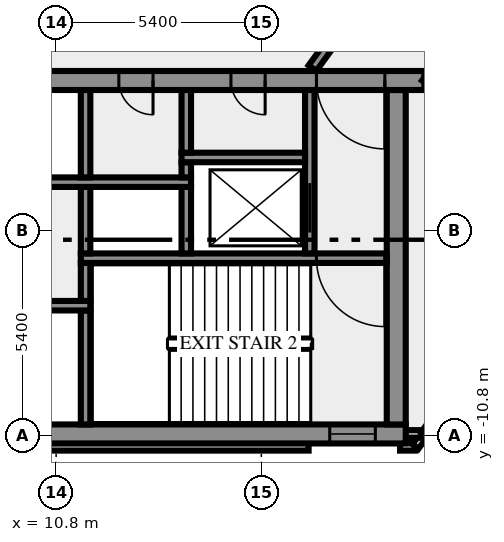
"""IFC4 building model, lengths in metres.
Left out: names, types, materials, properties, quantities, classifications, styles, units other than length and angle.
Written with IfcOpenShell. Run it as: python <this file> out.ifc"""

import sys

from ifc_helpers import new_model, si_unit, direction, frame, frame_2d, origin, place, context, subcontext, project, spatial, rectangle, extrude, element, fill, save


model = new_model("IFC4")
c1 = context("Model", 3, precision=1e-05, world=origin(), true_north=direction((0.0, 1.0)))
c2 = subcontext(c1, "Body", "Model", "MODEL_VIEW")
j1 = project(units=[si_unit("LENGTHUNIT", "METRE"), si_unit("PLANEANGLEUNIT", "RADIAN")], contexts=[c1])
p1 = place(None, origin())
s1 = spatial("IfcSite", under=j1, at=p1, CompositionType="ELEMENT")
p2 = place(p1, origin())
s2 = spatial("IfcBuilding", under=s1, at=p2, CompositionType="ELEMENT")
p3 = place(p2, frame((0.0, 0.0, 117.0)))
s3 = spatial("IfcBuildingStorey", under=s2, at=p3, CompositionType="ELEMENT", Elevation=117.0)
p4 = place(p3, frame((-17.444, -11.088, 0.0), z_axis=(0.0, 0.0, 1.0), x_axis=(1.0, 0.0, 0.0)))
e1 = element("IfcWall", 1, at=p4, inside=s3, PredefinedType="SOLIDWALL", context=c2, shape_type="SweptSolid", body=[
    extrude(rectangle(XDim=34.888, YDim=0.2, at=frame_2d((17.444, 0.0))), origin(), (0.0, 0.0, 1.0), 3.65),
])
p5 = place(p3, frame((19.85, -11.088, 0.0), z_axis=(0.0, 0.0, 1.0), x_axis=(1.0, 0.0, 0.0)))
e2 = element("IfcWall", 2, at=p5, inside=s3, PredefinedType="SOLIDWALL", context=c2, shape_type="SweptSolid", body=[
    extrude(rectangle(XDim=0.406, YDim=0.2, at=frame_2d((0.203, 0.0))), origin(), (0.0, 0.0, 1.0), 3.65),
])
p6 = place(p3, frame((20.253, -11.083, 0.0), z_axis=(0.0, 0.0, 1.0), x_axis=(0.587766567315, 0.809030569476, 0.0)))
e3 = element("IfcWall", 3, at=p6, inside=s3, PredefinedType="SOLIDWALL", context=c2, shape_type="SweptSolid", body=[
    extrude(rectangle(XDim=2.688, YDim=0.2, at=frame_2d((1.344, 0.0))), origin(), (0.0, 0.0, 1.0), 3.65),
])
p7 = place(p3, frame((19.98, -10.75, 0.0), z_axis=(0.0, 0.0, 1.0), x_axis=(1.0, 0.0, 0.0)))
e4 = element("IfcWall", 4, at=p7, inside=s3, PredefinedType="SOLIDWALL", context=c2, shape_type="SweptSolid", body=[
    extrude(rectangle(XDim=0.417, YDim=0.2, at=frame_2d((0.208, 0.0))), origin(), (0.0, 0.0, 1.0), 3.65),
])
p8 = place(p3, frame((-20.0, -10.75, 0.0), z_axis=(0.0, 0.0, 1.0), x_axis=(1.0, 0.0, 0.0)))
e5 = element("IfcWall", 5, at=p8, inside=s3, PredefinedType="SHEAR", context=c2, shape_type="SweptSolid", body=[
    extrude(rectangle(XDim=40.0, YDim=0.5, at=frame_2d((20.0, 0.0))), origin(), (0.0, 0.0, 1.0), 3.65),
])
p9 = place(p8, frame((0.8, 0.0, 1.0)))
e6 = element("IfcOpeningElement", 6, at=p9, cuts=e5, PredefinedType="OPENING", context=c2, shape_type="SweptSolid", body=[
    extrude(rectangle(XDim=1.2, YDim=1.2, at=frame_2d((0.6, 0.6))), frame((0.0, 0.26, 0.0), z_axis=(0.0, -1.0, 0.0), x_axis=(1.0, 0.0, 0.0)), (0.0, 0.0, 1.0), 0.52),
])
p10 = place(p8, frame((38.0, 0.0, 1.0)))
e7 = element("IfcOpeningElement", 7, at=p10, cuts=e5, PredefinedType="OPENING", context=c2, shape_type="SweptSolid", body=[
    extrude(rectangle(XDim=1.2, YDim=1.2, at=frame_2d((0.6, 0.6))), frame((0.0, 0.26, 0.0), z_axis=(0.0, -1.0, 0.0), x_axis=(1.0, 0.0, 0.0)), (0.0, 0.0, 1.0), 0.52),
])
p11 = place(p3, frame((11.575, -10.5, 0.0), z_axis=(0.0, 0.0, 1.0), x_axis=(0.0, 1.0, 0.0)))
e8 = element("IfcWall", 8, at=p11, inside=s3, PredefinedType="SHEAR", context=c2, shape_type="SweptSolid", body=[
    extrude(rectangle(XDim=3.0, YDim=0.25, at=frame_2d((1.5, 0.0))), origin(), (0.0, 0.0, 1.0), 3.65),
])
p12 = place(p3, frame((19.75, -10.5, 0.0), z_axis=(0.0, 0.0, 1.0), x_axis=(0.0, 1.0, 0.0)))
e9 = element("IfcWall", 9, at=p12, inside=s3, PredefinedType="SHEAR", context=c2, shape_type="SweptSolid", body=[
    extrude(rectangle(XDim=8.8, YDim=0.5, at=frame_2d((4.4, 0.0))), origin(), (0.0, 0.0, 1.0), 3.65),
])
p13 = place(p3, frame((11.7, -7.375, 0.0), z_axis=(0.0, 0.0, 1.0), x_axis=(-1.0, 0.0, 0.0)))
e10 = element("IfcWall", 10, at=p13, inside=s3, PredefinedType="SHEAR", context=c2, shape_type="SweptSolid", body=[
    extrude(rectangle(XDim=23.4, YDim=0.25, at=frame_2d((11.7, 0.0))), origin(), (0.0, 0.0, 1.0), 3.65),
])
p14 = place(p13, frame((21.45, 0.0, 0.0)))
e11 = element("IfcOpeningElement", 11, at=p14, cuts=e10, PredefinedType="OPENING", context=c2, shape_type="SweptSolid", body=[
    extrude(rectangle(XDim=1.1, YDim=2.1, at=frame_2d((0.55, 1.05))), frame((0.0, 0.135, 0.0), z_axis=(0.0, -1.0, 0.0), x_axis=(1.0, 0.0, 0.0)), (0.0, 0.0, 1.0), 0.27),
])
p15 = place(p13, frame((18.95, 0.0, 0.0)))
e12 = element("IfcOpeningElement", 12, at=p15, cuts=e10, PredefinedType="OPENING", context=c2, shape_type="SweptSolid", body=[
    extrude(rectangle(XDim=1.1, YDim=2.1, at=frame_2d((0.55, 1.05))), frame((0.0, 0.135, 0.0), z_axis=(0.0, -1.0, 0.0), x_axis=(1.0, 0.0, 0.0)), (0.0, 0.0, 1.0), 0.27),
])
p16 = place(p13, frame((16.45, 0.0, 0.0)))
e13 = element("IfcOpeningElement", 13, at=p16, cuts=e10, PredefinedType="OPENING", context=c2, shape_type="SweptSolid", body=[
    extrude(rectangle(XDim=1.1, YDim=2.1, at=frame_2d((0.55, 1.05))), frame((0.0, 0.135, 0.0), z_axis=(0.0, -1.0, 0.0), x_axis=(1.0, 0.0, 0.0)), (0.0, 0.0, 1.0), 0.27),
])
p17 = place(p13, frame((13.875, 0.0, 0.0)))
e14 = element("IfcOpeningElement", 14, at=p17, cuts=e10, PredefinedType="OPENING", context=c2, shape_type="SweptSolid", body=[
    extrude(rectangle(XDim=0.9, YDim=2.1, at=frame_2d((0.45, 1.05))), frame((0.0, 0.135, 0.0), z_axis=(0.0, -1.0, 0.0), x_axis=(1.0, 0.0, 0.0)), (0.0, 0.0, 1.0), 0.27),
])
p18 = place(p13, frame((11.1, 0.0, 0.0)))
e15 = element("IfcOpeningElement", 15, at=p18, cuts=e10, PredefinedType="OPENING", context=c2, shape_type="SweptSolid", body=[
    extrude(rectangle(XDim=0.9, YDim=2.1, at=frame_2d((0.45, 1.05))), frame((0.0, 0.135, 0.0), z_axis=(0.0, -1.0, 0.0), x_axis=(1.0, 0.0, 0.0)), (0.0, 0.0, 1.0), 0.27),
])
p19 = place(p3, frame((11.575, -7.25, 0.0), z_axis=(0.0, 0.0, 1.0), x_axis=(0.0, 1.0, 0.0)))
e16 = element("IfcWall", 16, at=p19, inside=s3, PredefinedType="SHEAR", context=c2, shape_type="SweptSolid", body=[
    extrude(rectangle(XDim=1.0, YDim=0.25, at=frame_2d((0.5, 0.0))), origin(), (0.0, 0.0, 1.0), 3.65),
])
p20 = place(p3, frame((19.5, -6.125, 0.0), z_axis=(0.0, 0.0, 1.0), x_axis=(-1.0, 0.0, 0.0)))
e17 = element("IfcWall", 17, at=p20, inside=s3, PredefinedType="SHEAR", context=c2, shape_type="SweptSolid", body=[
    extrude(rectangle(XDim=8.05, YDim=0.25, at=frame_2d((4.025, 0.0))), origin(), (0.0, 0.0, 1.0), 3.65),
])
p21 = place(p20, frame((0.05, 0.0, 0.0)))
e18 = element("IfcOpeningElement", 18, at=p21, cuts=e17, PredefinedType="OPENING", context=c2, shape_type="SweptSolid", body=[
    extrude(rectangle(XDim=1.8, YDim=2.1, at=frame_2d((0.9, 1.05))), frame((0.0, 0.135, 0.0), z_axis=(0.0, -1.0, 0.0), x_axis=(1.0, 0.0, 0.0)), (0.0, 0.0, 1.0), 0.27),
])
for number, where, z_axis, x_axis in (
    (19, (11.575, -6.0, 0.0), (0.0, 0.0, 1.0), (0.0, 1.0, 0.0)),
    (20, (14.225, -6.0, 0.0), (0.0, 0.0, 1.0), (0.0, 1.0, 0.0)),
):
    element("IfcWall", number, at=place(p3, frame(where, z_axis=z_axis, x_axis=x_axis)), inside=s3, PredefinedType="SHEAR", context=c2, shape_type="SweptSolid", body=[
        extrude(rectangle(XDim=1.75, YDim=0.25, at=frame_2d((0.875, 0.0))), origin(), (0.0, 0.0, 1.0), 3.65),
    ])
p22 = place(p3, frame((17.475, -6.0, 0.0), z_axis=(0.0, 0.0, 1.0), x_axis=(0.0, 1.0, 0.0)))
e21 = element("IfcWall", 21, at=p22, inside=s3, PredefinedType="SHEAR", context=c2, shape_type="SweptSolid", body=[
    extrude(rectangle(XDim=4.3, YDim=0.25, at=frame_2d((2.15, 0.0))), origin(), (0.0, 0.0, 1.0), 3.65),
])
p23 = place(p22, frame((0.55, 0.0, 0.0)))
e22 = element("IfcOpeningElement", 22, at=p23, cuts=e21, PredefinedType="OPENING", context=c2, shape_type="SweptSolid", body=[
    extrude(rectangle(XDim=1.3, YDim=2.1, at=frame_2d((0.65, 1.05))), frame((0.0, 0.135, 0.0), z_axis=(0.0, -1.0, 0.0), x_axis=(1.0, 0.0, 0.0)), (0.0, 0.0, 1.0), 0.27),
])
p24 = place(p3, frame((-0.6, -4.125, 0.0), z_axis=(0.0, 0.0, 1.0), x_axis=(1.0, 0.0, 0.0)))
e23 = element("IfcWall", 23, at=p24, inside=s3, PredefinedType="SHEAR", context=c2, shape_type="SweptSolid", body=[
    extrude(rectangle(XDim=14.95, YDim=0.25, at=frame_2d((7.475, 0.0))), origin(), (0.0, 0.0, 1.0), 3.65),
])
p25 = place(p24, frame((2.75, 0.0, 0.0)))
e24 = element("IfcOpeningElement", 24, at=p25, cuts=e23, PredefinedType="OPENING", context=c2, shape_type="SweptSolid", body=[
    extrude(rectangle(XDim=1.3, YDim=2.1, at=frame_2d((0.65, 1.05))), frame((0.0, 0.135, 0.0), z_axis=(0.0, -1.0, 0.0), x_axis=(1.0, 0.0, 0.0)), (0.0, 0.0, 1.0), 0.27),
])
p26 = place(p3, frame((11.575, -4.0, 0.0), z_axis=(0.0, 0.0, 1.0), x_axis=(0.0, 1.0, 0.0)))
e25 = element("IfcWall", 25, at=p26, inside=s3, PredefinedType="SHEAR", context=c2, shape_type="SweptSolid", body=[
    extrude(rectangle(XDim=2.3, YDim=0.25, at=frame_2d((1.15, 0.0))), origin(), (0.0, 0.0, 1.0), 3.65),
])
p27 = place(p3, frame((14.225, -4.0, 0.0), z_axis=(0.0, 0.0, 1.0), x_axis=(0.0, 1.0, 0.0)))
e26 = element("IfcWall", 26, at=p27, inside=s3, PredefinedType="SHEAR", context=c2, shape_type="SweptSolid", body=[
    extrude(rectangle(XDim=0.4, YDim=0.25, at=frame_2d((0.2, 0.0))), origin(), (0.0, 0.0, 1.0), 3.65),
])
p28 = place(p3, frame((14.1, -3.475, 0.0), z_axis=(0.0, 0.0, 1.0), x_axis=(1.0, 0.0, 0.0)))
e27 = element("IfcWall", 27, at=p28, inside=s3, PredefinedType="SHEAR", context=c2, shape_type="SweptSolid", body=[
    extrude(rectangle(XDim=3.25, YDim=0.25, at=frame_2d((1.625, 0.0))), origin(), (0.0, 0.0, 1.0), 3.65),
])
p29 = place(p3, frame((14.225, -3.35, 0.0), z_axis=(0.0, 0.0, 1.0), x_axis=(0.0, 1.0, 0.0)))
e28 = element("IfcWall", 28, at=p29, inside=s3, PredefinedType="SHEAR", context=c2, shape_type="SweptSolid", body=[
    extrude(rectangle(XDim=1.65, YDim=0.25, at=frame_2d((0.825, 0.0))), origin(), (0.0, 0.0, 1.0), 3.65),
])
p30 = place(p3, frame((20.49, -1.45, 0.0), z_axis=(0.0, 0.0, 1.0), x_axis=(-1.0, 0.0, 0.0)))
e29 = element("IfcWall", 29, at=p30, inside=s3, PredefinedType="SHEAR", context=c2, shape_type="SweptSolid", body=[
    extrude(rectangle(XDim=40.98, YDim=0.5, at=frame_2d((20.49, 0.0))), origin(), (0.0, 0.0, 1.0), 3.65),
])
p31 = place(p30, frame((38.14, 0.0, 0.0)))
e30 = element("IfcOpeningElement", 30, at=p31, cuts=e29, PredefinedType="OPENING", context=c2, shape_type="SweptSolid", body=[
    extrude(rectangle(XDim=1.8, YDim=2.1, at=frame_2d((0.9, 1.05))), frame((0.0, 0.26, 0.0), z_axis=(0.0, -1.0, 0.0), x_axis=(1.0, 0.0, 0.0)), (0.0, 0.0, 1.0), 0.52),
])
p32 = place(p30, frame((36.728, 0.0, 0.0)))
e31 = element("IfcOpeningElement", 31, at=p32, cuts=e29, PredefinedType="OPENING", context=c2, shape_type="SweptSolid", body=[
    extrude(rectangle(XDim=0.8, YDim=2.1, at=frame_2d((0.4, 1.05))), frame((0.0, 0.26, 0.0), z_axis=(0.0, -1.0, 0.0), x_axis=(1.0, 0.0, 0.0)), (0.0, 0.0, 1.0), 0.52),
])
p33 = place(p30, frame((35.153, 0.0, 0.0)))
e32 = element("IfcOpeningElement", 32, at=p33, cuts=e29, PredefinedType="OPENING", context=c2, shape_type="SweptSolid", body=[
    extrude(rectangle(XDim=0.8, YDim=2.1, at=frame_2d((0.4, 1.05))), frame((0.0, 0.26, 0.0), z_axis=(0.0, -1.0, 0.0), x_axis=(1.0, 0.0, 0.0)), (0.0, 0.0, 1.0), 0.52),
])
p34 = place(p30, frame((32.94, 0.0, 0.0)))
e33 = element("IfcOpeningElement", 33, at=p34, cuts=e29, PredefinedType="OPENING", context=c2, shape_type="SweptSolid", body=[
    extrude(rectangle(XDim=0.9, YDim=2.1, at=frame_2d((0.45, 1.05))), frame((0.0, 0.26, 0.0), z_axis=(0.0, -1.0, 0.0), x_axis=(1.0, 0.0, 0.0)), (0.0, 0.0, 1.0), 0.52),
])
p35 = place(p30, frame((21.765, 0.0, 0.0)))
e34 = element("IfcOpeningElement", 34, at=p35, cuts=e29, PredefinedType="OPENING", context=c2, shape_type="SweptSolid", body=[
    extrude(rectangle(XDim=2.0, YDim=2.1, at=frame_2d((1.0, 1.05))), frame((0.0, 0.26, 0.0), z_axis=(0.0, -1.0, 0.0), x_axis=(1.0, 0.0, 0.0)), (0.0, 0.0, 1.0), 0.52),
])
p36 = place(p30, frame((7.14, 0.0, 0.0)))
e35 = element("IfcOpeningElement", 35, at=p36, cuts=e29, PredefinedType="OPENING", context=c2, shape_type="SweptSolid", body=[
    extrude(rectangle(XDim=0.9, YDim=2.1, at=frame_2d((0.45, 1.05))), frame((0.0, 0.26, 0.0), z_axis=(0.0, -1.0, 0.0), x_axis=(1.0, 0.0, 0.0)), (0.0, 0.0, 1.0), 0.52),
])
p37 = place(p30, frame((4.19, 0.0, 0.0)))
e36 = element("IfcOpeningElement", 36, at=p37, cuts=e29, PredefinedType="OPENING", context=c2, shape_type="SweptSolid", body=[
    extrude(rectangle(XDim=0.9, YDim=2.1, at=frame_2d((0.45, 1.05))), frame((0.0, 0.26, 0.0), z_axis=(0.0, -1.0, 0.0), x_axis=(1.0, 0.0, 0.0)), (0.0, 0.0, 1.0), 0.52),
])
p38 = place(p30, frame((1.04, 0.0, 0.0)))
e37 = element("IfcOpeningElement", 37, at=p38, cuts=e29, PredefinedType="OPENING", context=c2, shape_type="SweptSolid", body=[
    extrude(rectangle(XDim=1.8, YDim=2.1, at=frame_2d((0.9, 1.05))), frame((0.0, 0.26, 0.0), z_axis=(0.0, -1.0, 0.0), x_axis=(1.0, 0.0, 0.0)), (0.0, 0.0, 1.0), 0.52),
])
p39 = place(p3, frame((40.463, 25.911, 0.0), z_axis=(0.0, 0.0, 1.0), x_axis=(-0.587781654618, -0.809019608226, 0.0)))
e38 = element("IfcWall", 38, at=p39, inside=s3, PredefinedType="SOLIDWALL", context=c2, shape_type="SweptSolid", body=[
    extrude(rectangle(XDim=33.911, YDim=0.25, at=frame_2d((16.956, 0.0))), origin(), (0.0, 0.0, 1.0), 3.65),
])
p40 = place(p39, frame((21.396, 0.0, 0.0)))
e39 = element("IfcOpeningElement", 39, at=p40, cuts=e38, PredefinedType="OPENING", context=c2, shape_type="SweptSolid", body=[
    extrude(rectangle(XDim=0.9, YDim=2.1, at=frame_2d((0.45, 1.05))), frame((0.0, 0.135, 0.0), z_axis=(0.0, -1.0, 0.0), x_axis=(1.0, 0.0, 0.0)), (0.0, 0.0, 1.0), 0.27),
])
p41 = place(p39, frame((19.795, 0.0, 0.0)))
e40 = element("IfcOpeningElement", 40, at=p41, cuts=e38, PredefinedType="OPENING", context=c2, shape_type="SweptSolid", body=[
    extrude(rectangle(XDim=0.9, YDim=2.1, at=frame_2d((0.45, 1.05))), frame((0.0, 0.135, 0.0), z_axis=(0.0, -1.0, 0.0), x_axis=(1.0, 0.0, 0.0)), (0.0, 0.0, 1.0), 0.27),
])
p42 = place(p3, frame((17.545, -1.125, 0.0), z_axis=(0.0, 0.0, 1.0), x_axis=(0.587788021768, 0.809014982226, 0.0)))
e41 = element("IfcWall", 41, at=p42, inside=s3, PredefinedType="SOLIDWALL", context=c2, shape_type="SweptSolid", body=[
    extrude(rectangle(XDim=35.344, YDim=0.25, at=frame_2d((17.672, 0.0))), origin(), (0.0, 0.0, 1.0), 3.65),
])
p43 = place(p42, frame((17.508, 0.0, 0.0)))
e42 = element("IfcOpeningElement", 42, at=p43, cuts=e41, PredefinedType="OPENING", context=c2, shape_type="SweptSolid", body=[
    extrude(rectangle(XDim=0.9, YDim=2.1, at=frame_2d((0.45, 1.05))), frame((0.0, 0.135, 0.0), z_axis=(0.0, -1.0, 0.0), x_axis=(1.0, 0.0, 0.0)), (0.0, 0.0, 1.0), 0.27),
])
p44 = place(p42, frame((21.808, 0.0, 0.0)))
e43 = element("IfcOpeningElement", 43, at=p44, cuts=e41, PredefinedType="OPENING", context=c2, shape_type="SweptSolid", body=[
    extrude(rectangle(XDim=0.9, YDim=2.1, at=frame_2d((0.45, 1.05))), frame((0.0, 0.135, 0.0), z_axis=(0.0, -1.0, 0.0), x_axis=(1.0, 0.0, 0.0)), (0.0, 0.0, 1.0), 0.27),
])
p45 = place(p42, frame((19.108, 0.0, 0.0)))
e44 = element("IfcOpeningElement", 44, at=p45, cuts=e41, PredefinedType="OPENING", context=c2, shape_type="SweptSolid", body=[
    extrude(rectangle(XDim=0.9, YDim=2.1, at=frame_2d((0.45, 1.05))), frame((0.0, 0.135, 0.0), z_axis=(0.0, -1.0, 0.0), x_axis=(1.0, 0.0, 0.0)), (0.0, 0.0, 1.0), 0.27),
])
p46 = place(p10, origin())
e45 = element("IfcWindow", 45, at=p46, inside=s3, PartitioningType="SINGLE_PANEL", PredefinedType="WINDOW", context=c2, shape_type="SweptSolid", body=[
    extrude(rectangle(XDim=1.2, YDim=1.2, at=frame_2d((0.6, 0.6))), frame((0.0, 0.03, 0.0), z_axis=(0.0, -1.0, 0.0), x_axis=(1.0, 0.0, 0.0)), (0.0, 0.0, 1.0), 0.06),
])
fill(e7, e45)
p47 = place(p21, origin())
e46 = element("IfcDoor", 46, at=p47, inside=s3, OperationType="DOUBLE_DOOR_SINGLE_SWING", PredefinedType="DOOR", context=c2, shape_type="SweptSolid", body=[
    extrude(rectangle(XDim=1.8, YDim=2.1, at=frame_2d((0.9, 1.05))), frame((0.0, 0.025, 0.0), z_axis=(0.0, -1.0, 0.0), x_axis=(1.0, 0.0, 0.0)), (0.0, 0.0, 1.0), 0.05),
])
fill(e18, e46)
p48 = place(p23, origin())
e47 = element("IfcDoor", 47, at=p48, inside=s3, OperationType="DOUBLE_DOOR_SLIDING", PredefinedType="DOOR", context=c2, shape_type="SweptSolid", body=[
    extrude(rectangle(XDim=1.3, YDim=2.1, at=frame_2d((0.65, 1.05))), frame((0.0, 0.025, 0.0), z_axis=(0.0, -1.0, 0.0), x_axis=(1.0, 0.0, 0.0)), (0.0, 0.0, 1.0), 0.05),
])
fill(e22, e47)
p49 = place(p36, origin())
e48 = element("IfcDoor", 48, at=p49, inside=s3, OperationType="SINGLE_SWING_LEFT", PredefinedType="DOOR", context=c2, shape_type="SweptSolid", body=[
    extrude(rectangle(XDim=0.9, YDim=2.1, at=frame_2d((0.45, 1.05))), frame((0.0, 0.025, 0.0), z_axis=(0.0, -1.0, 0.0), x_axis=(1.0, 0.0, 0.0)), (0.0, 0.0, 1.0), 0.05),
])
fill(e35, e48)
p50 = place(p37, origin())
e49 = element("IfcDoor", 49, at=p50, inside=s3, OperationType="SINGLE_SWING_LEFT", PredefinedType="DOOR", context=c2, shape_type="SweptSolid", body=[
    extrude(rectangle(XDim=0.9, YDim=2.1, at=frame_2d((0.45, 1.05))), frame((0.0, 0.025, 0.0), z_axis=(0.0, -1.0, 0.0), x_axis=(1.0, 0.0, 0.0)), (0.0, 0.0, 1.0), 0.05),
])
fill(e36, e49)
p51 = place(p38, origin())
e50 = element("IfcDoor", 50, at=p51, inside=s3, OperationType="DOUBLE_DOOR_SINGLE_SWING", PredefinedType="DOOR", context=c2, shape_type="SweptSolid", body=[
    extrude(rectangle(XDim=1.8, YDim=2.1, at=frame_2d((0.9, 1.05))), frame((0.0, 0.025, 0.0), z_axis=(0.0, -1.0, 0.0), x_axis=(1.0, 0.0, 0.0)), (0.0, 0.0, 1.0), 0.05),
])
fill(e37, e50)
save(model, sys.argv[1])
